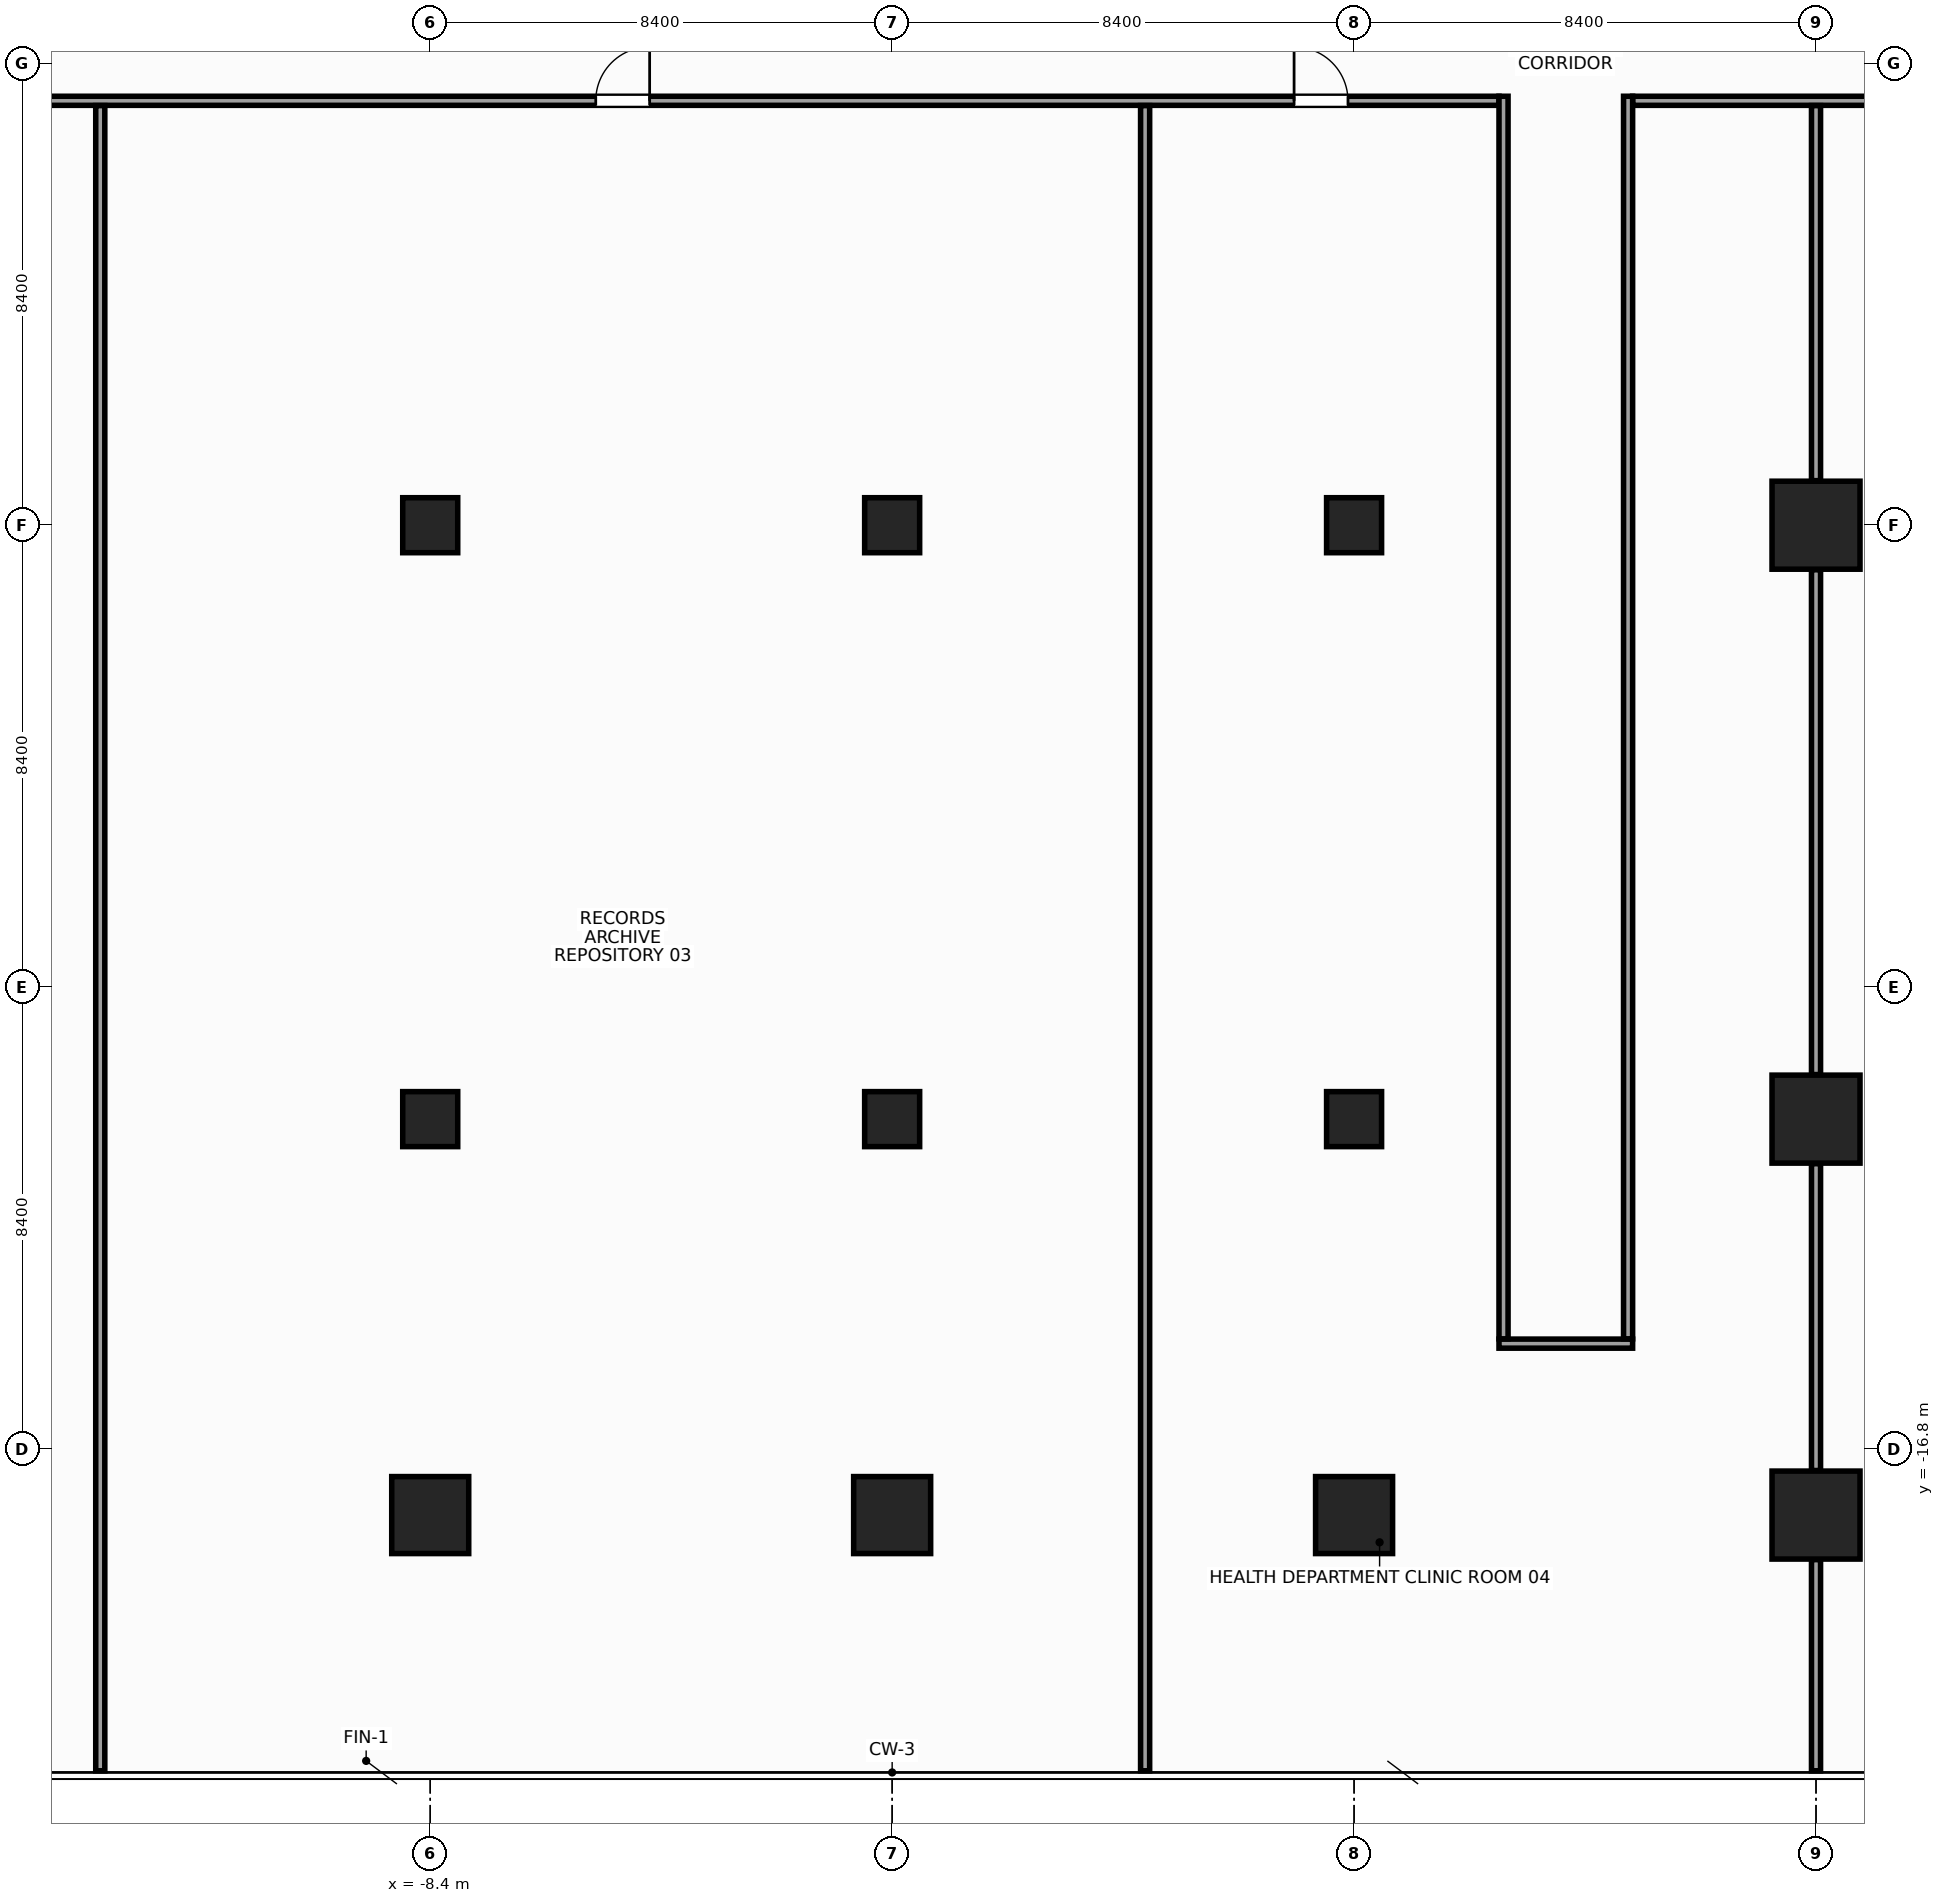
"""IFC4 building model, lengths in metres.
Left out: names, types, materials, properties, quantities, classifications, styles, units other than length and angle.
Written with IfcOpenShell. Run it as: python <this file> out.ifc"""

import sys

from ifc_helpers import new_model, si_unit, direction, frame, frame_2d, origin, origin_2d, place, context, subcontext, project, spatial, rectangle, hollow_rectangle, extrude, source, transform, mapped, element, fill, save


model = new_model("IFC4")
c1 = context("Model", 3, precision=1e-05, world=origin(), true_north=direction((0.0, 1.0)))
c2 = subcontext(c1, "Body", "Model", "MODEL_VIEW")
j1 = project(units=[si_unit("LENGTHUNIT", "METRE"), si_unit("PLANEANGLEUNIT", "RADIAN")], contexts=[c1])
p1 = place(None, origin())
s1 = spatial("IfcSite", under=j1, at=p1, CompositionType="ELEMENT")
p2 = place(p1, origin())
s2 = spatial("IfcBuilding", under=s1, at=p2, CompositionType="ELEMENT")
p3 = place(p2, frame((0.0, 0.0, 160.4)))
s3 = spatial("IfcBuildingStorey", under=s2, at=p3, CompositionType="ELEMENT", Elevation=160.4)
m1 = source(origin(), c2, "Body", "SweptSolid", [
    extrude(rectangle(XDim=1.6, YDim=1.6, at=origin_2d()), origin(), (0.0, 0.0, 1.0), 3.6),
])
for number, where, z_axis, x_axis in (
    (1, (16.8, -18.0, 0.0), (0.0, 0.0, 1.0), (1.0, 0.0, 0.0)),
    (2, (16.8, -10.8, 0.0), (0.0, 0.0, 1.0), (1.0, 0.0, 0.0)),
    (3, (16.8, 0.0, 0.0), (0.0, 0.0, 1.0), (1.0, 0.0, 0.0)),
):
    element("IfcColumn", number, at=place(p3, frame(where, z_axis=z_axis, x_axis=x_axis)), inside=s3, PredefinedType="COLUMN", context=c2, shape_type="MappedRepresentation", body=[
        mapped(m1, transform((0.0, 0.0, 0.0), x_axis=(1.0, 0.0, 0.0), y_axis=(0.0, 1.0, 0.0), z_axis=(0.0, 0.0, 1.0), scale=1.0)),
    ])
m2 = source(origin(), c2, "Body", "SweptSolid", [
    extrude(rectangle(XDim=1.4, YDim=1.4, at=origin_2d()), origin(), (0.0, 0.0, 1.0), 3.6),
])
p4 = place(p3, frame((-8.4, -18.0, 0.0), z_axis=(0.0, 0.0, 1.0), x_axis=(1.0, 0.0, 0.0)))
e4 = element("IfcColumn", 4, at=p4, inside=s3, PredefinedType="COLUMN", context=c2, shape_type="MappedRepresentation", body=[
    mapped(m2, transform((0.0, 0.0, 0.0), x_axis=(1.0, 0.0, 0.0), y_axis=(0.0, 1.0, 0.0), z_axis=(0.0, 0.0, 1.0), scale=1.0)),
])
m3 = source(origin(), c2, "Body", "SweptSolid", [
    extrude(hollow_rectangle(XDim=1.0, YDim=1.0, WallThickness=0.045, at=origin_2d()), origin(), (0.0, 0.0, 1.0), 3.6),
])
for number, where, z_axis, x_axis in (
    (5, (-8.4, 0.0, 0.0), (0.0, 0.0, 1.0), (1.0, 0.0, 0.0)),
    (6, (-8.4, -10.8, 0.0), (0.0, 0.0, 1.0), (1.0, 0.0, 0.0)),
):
    element("IfcColumn", number, at=place(p3, frame(where, z_axis=z_axis, x_axis=x_axis)), inside=s3, PredefinedType="COLUMN", context=c2, shape_type="MappedRepresentation", body=[
        mapped(m3, transform((0.0, 0.0, 0.0), x_axis=(1.0, 0.0, 0.0), y_axis=(0.0, 1.0, 0.0), z_axis=(0.0, 0.0, 1.0), scale=1.0)),
    ])
p5 = place(p3, frame((8.4, -18.0, 0.0), z_axis=(0.0, 0.0, 1.0), x_axis=(1.0, 0.0, 0.0)))
e7 = element("IfcColumn", 7, at=p5, inside=s3, PredefinedType="COLUMN", context=c2, shape_type="MappedRepresentation", body=[
    mapped(m2, transform((0.0, 0.0, 0.0), x_axis=(1.0, 0.0, 0.0), y_axis=(0.0, 1.0, 0.0), z_axis=(0.0, 0.0, 1.0), scale=1.0)),
])
for number, where, z_axis, x_axis in (
    (8, (8.4, 0.0, 0.0), (0.0, 0.0, 1.0), (1.0, 0.0, 0.0)),
    (9, (8.4, -10.8, 0.0), (0.0, 0.0, 1.0), (1.0, 0.0, 0.0)),
):
    element("IfcColumn", number, at=place(p3, frame(where, z_axis=z_axis, x_axis=x_axis)), inside=s3, PredefinedType="COLUMN", context=c2, shape_type="MappedRepresentation", body=[
        mapped(m3, transform((0.0, 0.0, 0.0), x_axis=(1.0, 0.0, 0.0), y_axis=(0.0, 1.0, 0.0), z_axis=(0.0, 0.0, 1.0), scale=1.0)),
    ])
p6 = place(p3, frame((0.0, -18.0, 0.0), z_axis=(0.0, 0.0, 1.0), x_axis=(1.0, 0.0, 0.0)))
e10 = element("IfcColumn", 10, at=p6, inside=s3, PredefinedType="COLUMN", context=c2, shape_type="MappedRepresentation", body=[
    mapped(m2, transform((0.0, 0.0, 0.0), x_axis=(1.0, 0.0, 0.0), y_axis=(0.0, 1.0, 0.0), z_axis=(0.0, 0.0, 1.0), scale=1.0)),
])
m4 = source(origin(), c2, "Body", "SweptSolid", [
    extrude(rectangle(XDim=1.0, YDim=1.0, at=origin_2d()), origin(), (0.0, 0.0, 1.0), 3.6),
])
for number, where, z_axis, x_axis in (
    (11, (0.0, -10.8, 0.0), (0.0, 0.0, 1.0), (1.0, 0.0, 0.0)),
    (12, (0.0, 0.0, 0.0), (0.0, 0.0, 1.0), (1.0, 0.0, 0.0)),
):
    element("IfcColumn", number, at=place(p3, frame(where, z_axis=z_axis, x_axis=x_axis)), inside=s3, PredefinedType="COLUMN", context=c2, shape_type="MappedRepresentation", body=[
        mapped(m4, transform((0.0, 0.0, 0.0), x_axis=(1.0, 0.0, 0.0), y_axis=(0.0, 1.0, 0.0), z_axis=(0.0, 0.0, 1.0), scale=1.0)),
    ])
m5 = source(origin(), c2, "Body", "SweptSolid", [
    extrude(rectangle(XDim=31.6, YDim=0.165, at=frame_2d((15.8, 0.0))), origin(), (0.0, 0.0, 1.0), 2.765),
])
p7 = place(p3, frame((-20.565, 7.718, 0.0), z_axis=(0.0, 0.0, 1.0), x_axis=(1.0, 0.0, 0.0)))
e13 = element("IfcWall", 13, at=p7, inside=s3, PredefinedType="PARTITIONING", context=c2, shape_type="MappedRepresentation", body=[
    mapped(m5, transform((0.0, 0.0, 0.0), x_axis=(1.0, 0.0, 0.0), y_axis=(0.0, 1.0, 0.0), z_axis=(0.0, 0.0, 1.0), scale=1.0)),
])
p8 = place(p7, frame((2.614, 0.0, 0.0)))
e14 = element("IfcOpeningElement", 14, at=p8, cuts=e13, PredefinedType="OPENING", context=c2, shape_type="SweptSolid", body=[
    extrude(rectangle(XDim=0.98, YDim=2.15, at=frame_2d((0.49, 1.075))), frame((0.0, 0.094, 0.0), z_axis=(0.0, -1.0, 0.0), x_axis=(1.0, 0.0, 0.0)), (0.0, 0.0, 1.0), 0.189),
])
p9 = place(p7, frame((15.175, 0.0, 0.0)))
e15 = element("IfcOpeningElement", 15, at=p9, cuts=e13, PredefinedType="OPENING", context=c2, shape_type="SweptSolid", body=[
    extrude(rectangle(XDim=0.98, YDim=2.15, at=frame_2d((0.49, 1.075))), frame((0.0, 0.094, 0.0), z_axis=(0.0, -1.0, 0.0), x_axis=(1.0, 0.0, 0.0)), (0.0, 0.0, 1.0), 0.189),
])
p10 = place(p7, frame((27.874, 0.0, 0.0)))
e16 = element("IfcOpeningElement", 16, at=p10, cuts=e13, PredefinedType="OPENING", context=c2, shape_type="SweptSolid", body=[
    extrude(rectangle(XDim=0.98, YDim=2.15, at=frame_2d((0.49, 1.075))), frame((0.0, 0.094, 0.0), z_axis=(0.0, -1.0, 0.0), x_axis=(1.0, 0.0, 0.0)), (0.0, 0.0, 1.0), 0.189),
])
m6 = source(origin(), c2, "Body", "SweptSolid", [
    extrude(rectangle(XDim=7.1, YDim=0.165, at=frame_2d((3.55, 0.0))), origin(), (0.0, 0.0, 1.0), 2.765),
])
p11 = place(p3, frame((13.465, 7.718, 0.0), z_axis=(0.0, 0.0, 1.0), x_axis=(1.0, 0.0, 0.0)))
e17 = element("IfcWall", 17, at=p11, inside=s3, PredefinedType="PARTITIONING", context=c2, shape_type="MappedRepresentation", body=[
    mapped(m6, transform((0.0, 0.0, 0.0), x_axis=(1.0, 0.0, 0.0), y_axis=(0.0, 1.0, 0.0), z_axis=(0.0, 0.0, 1.0), scale=1.0)),
])
p12 = place(p11, frame((4.706, 0.0, 0.0)))
e18 = element("IfcOpeningElement", 18, at=p12, cuts=e17, PredefinedType="OPENING", context=c2, shape_type="SweptSolid", body=[
    extrude(rectangle(XDim=0.98, YDim=2.15, at=frame_2d((0.49, 1.075))), frame((0.0, 0.094, 0.0), z_axis=(0.0, -1.0, 0.0), x_axis=(1.0, 0.0, 0.0)), (0.0, 0.0, 1.0), 0.189),
])
m7 = source(origin(), c2, "Body", "SweptSolid", [
    extrude(rectangle(XDim=2.43, YDim=0.165, at=frame_2d((1.215, 0.0))), origin(), (0.0, 0.0, 1.0), 3.38),
])
p13 = place(p3, frame((11.035, -14.883, 0.0), z_axis=(0.0, 0.0, 1.0), x_axis=(1.0, 0.0, 0.0)))
e19 = element("IfcWall", 19, at=p13, inside=s3, PredefinedType="PARTITIONING", context=c2, shape_type="MappedRepresentation", body=[
    mapped(m7, transform((0.0, 0.0, 0.0), x_axis=(1.0, 0.0, 0.0), y_axis=(0.0, 1.0, 0.0), z_axis=(0.0, 0.0, 1.0), scale=1.0)),
])
m8 = source(origin(), c2, "Body", "SweptSolid", [
    extrude(rectangle(XDim=22.595, YDim=0.165, at=frame_2d((11.297, 0.0))), origin(), (0.0, 0.0, 1.0), 2.665),
])
for number, where, z_axis, x_axis in (
    (20, (11.117, -14.795, 0.0), (0.0, 0.0, 1.0), (0.0, 1.0, 0.0)),
    (21, (13.383, -14.795, 0.0), (0.0, 0.0, 1.0), (0.0, 1.0, 0.0)),
):
    element("IfcWall", number, at=place(p3, frame(where, z_axis=z_axis, x_axis=x_axis)), inside=s3, PredefinedType="PARTITIONING", context=c2, shape_type="MappedRepresentation", body=[
        mapped(m8, transform((0.0, 0.0, 0.0), x_axis=(1.0, 0.0, 0.0), y_axis=(0.0, 1.0, 0.0), z_axis=(0.0, 0.0, 1.0), scale=1.0)),
    ])
m9 = source(origin(), c2, "Body", "SweptSolid", [
    extrude(rectangle(XDim=30.28, YDim=0.165, at=frame_2d((15.14, 0.0))), origin(), (0.0, 0.0, 1.0), 2.665),
])
for number, where, z_axis, x_axis in (
    (22, (-14.4, -22.65, 0.0), (0.0, 0.0, 1.0), (0.0, 1.0, 0.0)),
    (23, (4.6, -22.65, 0.0), (0.0, 0.0, 1.0), (0.0, 1.0, 0.0)),
):
    element("IfcWall", number, at=place(p3, frame(where, z_axis=z_axis, x_axis=x_axis)), inside=s3, PredefinedType="PARTITIONING", context=c2, shape_type="MappedRepresentation", body=[
        mapped(m9, transform((0.0, 0.0, 0.0), x_axis=(1.0, 0.0, 0.0), y_axis=(0.0, 1.0, 0.0), z_axis=(0.0, 0.0, 1.0), scale=1.0)),
    ])
m10 = source(origin(), c2, "Body", "SweptSolid", [
    extrude(rectangle(XDim=3.84, YDim=0.165, at=frame_2d((1.92, 0.0))), origin(), (0.0, 0.0, 1.0), 3.38),
])
p14 = place(p3, frame((16.8, -22.65, 0.0), z_axis=(0.0, 0.0, 1.0), x_axis=(0.0, 1.0, 0.0)))
e24 = element("IfcWall", 24, at=p14, inside=s3, PredefinedType="PARTITIONING", context=c2, shape_type="MappedRepresentation", body=[
    mapped(m10, transform((0.0, 0.0, 0.0), x_axis=(1.0, 0.0, 0.0), y_axis=(0.0, 1.0, 0.0), z_axis=(0.0, 0.0, 1.0), scale=1.0)),
])
m11 = source(origin(), c2, "Body", "SweptSolid", [
    extrude(rectangle(XDim=5.58, YDim=0.165, at=frame_2d((2.79, 0.0))), origin(), (0.0, 0.0, 1.0), 2.965),
])
p15 = place(p3, frame((16.8, -17.19, 0.0), z_axis=(0.0, 0.0, 1.0), x_axis=(0.0, 1.0, 0.0)))
e25 = element("IfcWall", 25, at=p15, inside=s3, PredefinedType="PARTITIONING", context=c2, shape_type="MappedRepresentation", body=[
    mapped(m11, transform((0.0, 0.0, 0.0), x_axis=(1.0, 0.0, 0.0), y_axis=(0.0, 1.0, 0.0), z_axis=(0.0, 0.0, 1.0), scale=1.0)),
])
m12 = source(origin(), c2, "Body", "SweptSolid", [
    extrude(rectangle(XDim=9.18, YDim=0.165, at=frame_2d((4.59, 0.0))), origin(), (0.0, 0.0, 1.0), 2.765),
])
p16 = place(p3, frame((16.8, -9.99, 0.0), z_axis=(0.0, 0.0, 1.0), x_axis=(0.0, 1.0, 0.0)))
e26 = element("IfcWall", 26, at=p16, inside=s3, PredefinedType="PARTITIONING", context=c2, shape_type="MappedRepresentation", body=[
    mapped(m12, transform((0.0, 0.0, 0.0), x_axis=(1.0, 0.0, 0.0), y_axis=(0.0, 1.0, 0.0), z_axis=(0.0, 0.0, 1.0), scale=1.0)),
])
m13 = source(origin(), c2, "Body", "SweptSolid", [
    extrude(rectangle(XDim=6.82, YDim=0.165, at=frame_2d((3.41, 0.0))), origin(), (0.0, 0.0, 1.0), 2.765),
])
p17 = place(p3, frame((16.8, 0.81, 0.0), z_axis=(0.0, 0.0, 1.0), x_axis=(0.0, 1.0, 0.0)))
e27 = element("IfcWall", 27, at=p17, inside=s3, PredefinedType="PARTITIONING", context=c2, shape_type="MappedRepresentation", body=[
    mapped(m13, transform((0.0, 0.0, 0.0), x_axis=(1.0, 0.0, 0.0), y_axis=(0.0, 1.0, 0.0), z_axis=(0.0, 0.0, 1.0), scale=1.0)),
])
m14 = source(origin(), c2, "Body", "SweptSolid", [
    extrude(rectangle(XDim=0.98, YDim=2.15, at=frame_2d((0.49, 1.075))), frame((0.0, 0.025, 0.0), z_axis=(0.0, -1.0, 0.0), x_axis=(1.0, 0.0, 0.0)), (0.0, 0.0, 1.0), 0.05),
])
p18 = place(p9, origin())
e28 = element("IfcDoor", 28, at=p18, inside=s3, OperationType="SINGLE_SWING_RIGHT", PredefinedType="DOOR", context=c2, shape_type="MappedRepresentation", body=[
    mapped(m14, transform((0.0, 0.0, 0.0), x_axis=(1.0, 0.0, 0.0), y_axis=(0.0, 1.0, 0.0), z_axis=(0.0, 0.0, 1.0), scale=1.0)),
])
fill(e15, e28)
p19 = place(p10, origin())
e29 = element("IfcDoor", 29, at=p19, inside=s3, OperationType="SINGLE_SWING_LEFT", PredefinedType="DOOR", context=c2, shape_type="MappedRepresentation", body=[
    mapped(m14, transform((0.0, 0.0, 0.0), x_axis=(1.0, 0.0, 0.0), y_axis=(0.0, 1.0, 0.0), z_axis=(0.0, 0.0, 1.0), scale=1.0)),
])
fill(e16, e29)
save(model, sys.argv[1])
